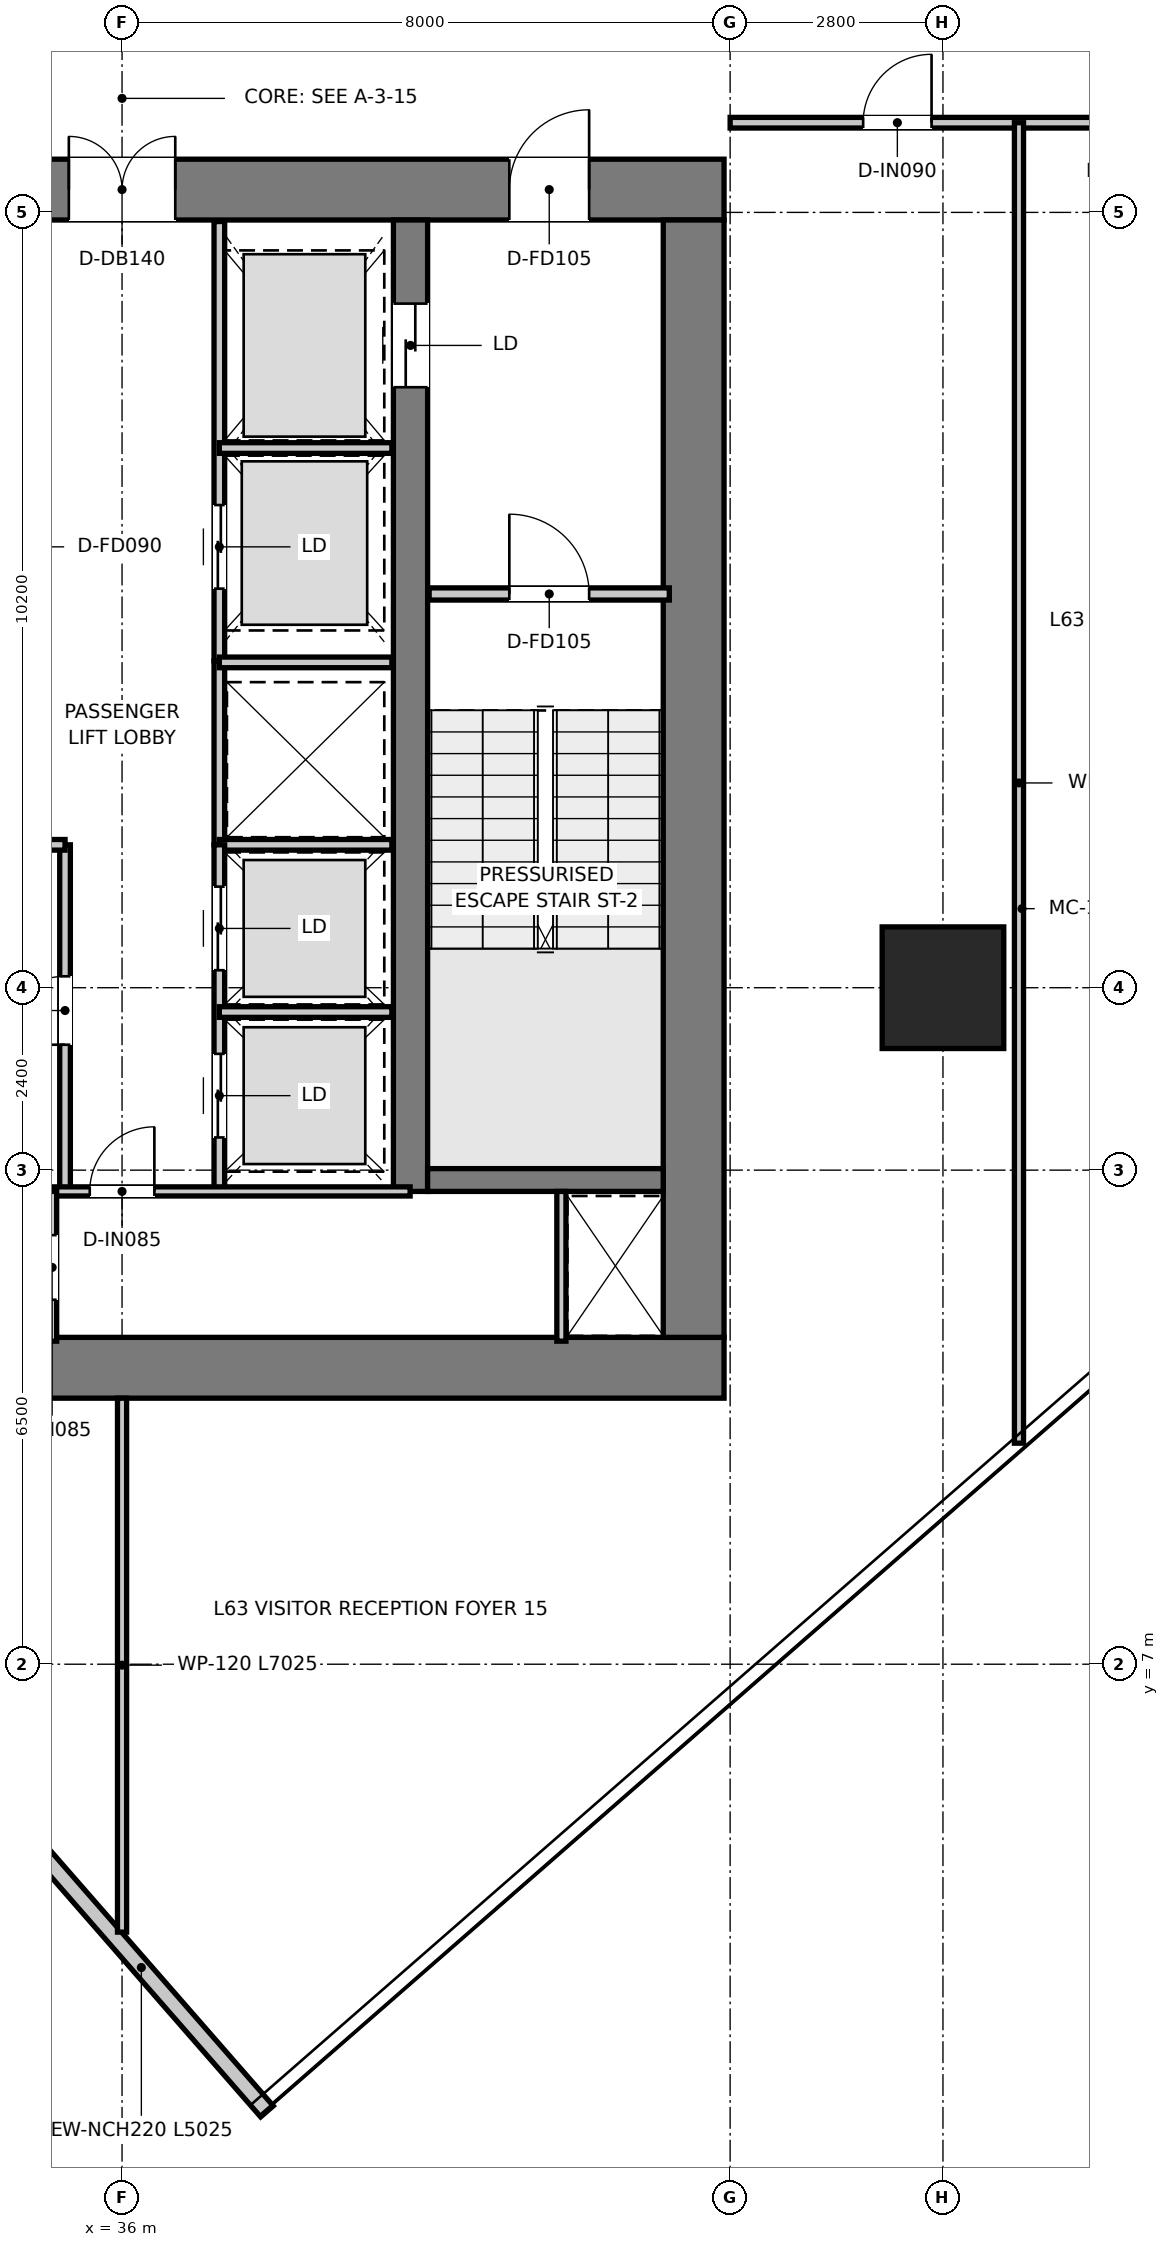
"""IFC4 building model, lengths in metres.
Left out: names, types, materials, properties, quantities, classifications, styles, units other than length and angle.
Written with IfcOpenShell. Run it as: python <this file> out.ifc"""

import sys

from ifc_helpers import new_model, si_unit, direction, frame, frame_2d, origin, origin_2d, place, context, subcontext, project, spatial, rectangle, extrude, source, transform, mapped, element, fill, save


model = new_model("IFC4")
c1 = context("Model", 3, precision=1e-05, world=origin(), true_north=direction((0.0, 1.0)))
c2 = subcontext(c1, "Body", "Model", "MODEL_VIEW")
j1 = project(units=[si_unit("LENGTHUNIT", "METRE"), si_unit("PLANEANGLEUNIT", "RADIAN")], contexts=[c1])
p1 = place(None, origin())
s1 = spatial("IfcSite", under=j1, at=p1, CompositionType="ELEMENT")
p2 = place(p1, origin())
s2 = spatial("IfcBuilding", under=s1, at=p2, CompositionType="ELEMENT")
p3 = place(p2, frame((0.0, 0.0, 258.65)))
s3 = spatial("IfcBuildingStorey", under=s2, at=p3, CompositionType="ELEMENT", Elevation=258.65)
p4 = place(p3, frame((28.08, 10.9, 0.0), z_axis=(0.0, 0.0, 1.0), x_axis=(1.0, 0.0, 0.0)))
e1 = element("IfcWall", 1, at=p4, inside=s3, PredefinedType="SHEAR", context=c2, shape_type="SweptSolid", body=[
    extrude(rectangle(XDim=15.84, YDim=0.8, at=frame_2d((7.92, 0.0))), origin(), (0.0, 0.0, 1.0), 3.95),
])
p5 = place(p3, frame((28.08, 26.4, 0.0), z_axis=(0.0, 0.0, 1.0), x_axis=(1.0, 0.0, 0.0)))
e2 = element("IfcWall", 2, at=p5, inside=s3, PredefinedType="SHEAR", context=c2, shape_type="SweptSolid", body=[
    extrude(rectangle(XDim=15.84, YDim=0.8, at=frame_2d((7.92, 0.0))), origin(), (0.0, 0.0, 1.0), 3.95),
])
p6 = place(p5, frame((7.22, 0.0, 0.0)))
e3 = element("IfcOpeningElement", 3, at=p6, cuts=e2, PredefinedType="OPENING", context=c2, shape_type="SweptSolid", body=[
    extrude(rectangle(XDim=1.4, YDim=2.2, at=frame_2d((0.7, 1.1))), frame((0.0, 0.41, 0.0), z_axis=(0.0, -1.0, 0.0), x_axis=(1.0, 0.0, 0.0)), (0.0, 0.0, 1.0), 0.82),
])
p7 = place(p5, frame((1.775, 0.0, 0.0)))
e4 = element("IfcOpeningElement", 4, at=p7, cuts=e2, PredefinedType="OPENING", context=c2, shape_type="SweptSolid", body=[
    extrude(rectangle(XDim=1.05, YDim=2.1, at=frame_2d((0.525, 1.05))), frame((0.0, 0.41, 0.0), z_axis=(0.0, -1.0, 0.0), x_axis=(1.0, 0.0, 0.0)), (0.0, 0.0, 1.0), 0.82),
])
p8 = place(p5, frame((13.015, 0.0, 0.0)))
e5 = element("IfcOpeningElement", 5, at=p8, cuts=e2, PredefinedType="OPENING", context=c2, shape_type="SweptSolid", body=[
    extrude(rectangle(XDim=1.05, YDim=2.1, at=frame_2d((0.525, 1.05))), frame((0.0, 0.41, 0.0), z_axis=(0.0, -1.0, 0.0), x_axis=(1.0, 0.0, 0.0)), (0.0, 0.0, 1.0), 0.82),
])
p9 = place(p3, frame((43.52, 11.3, 0.0), z_axis=(0.0, 0.0, 1.0), x_axis=(0.0, 1.0, 0.0)))
e6 = element("IfcWall", 6, at=p9, inside=s3, PredefinedType="SHEAR", context=c2, shape_type="SweptSolid", body=[
    extrude(rectangle(XDim=14.7, YDim=0.8, at=frame_2d((7.35, 0.0))), origin(), (0.0, 0.0, 1.0), 3.95),
])
p10 = place(p3, frame((39.795, 13.22, 0.0), z_axis=(0.0, 0.0, 1.0), x_axis=(0.0, 1.0, 0.0)))
e7 = element("IfcWall", 7, at=p10, inside=s3, PredefinedType="SHEAR", context=c2, shape_type="SweptSolid", body=[
    extrude(rectangle(XDim=12.78, YDim=0.45, at=frame_2d((6.39, 0.0))), origin(), (0.0, 0.0, 1.0), 3.95),
])
p11 = place(p10, frame((10.58, 0.0, 0.0)))
e8 = element("IfcOpeningElement", 8, at=p11, cuts=e7, PredefinedType="OPENING", context=c2, shape_type="SweptSolid", body=[
    extrude(rectangle(XDim=1.1, YDim=2.15, at=frame_2d((0.55, 1.075))), frame((0.0, 0.235, 0.0), z_axis=(0.0, -1.0, 0.0), x_axis=(1.0, 0.0, 0.0)), (0.0, 0.0, 1.0), 0.47),
])
p12 = place(p3, frame((40.02, 13.37, 0.0), z_axis=(0.0, 0.0, 1.0), x_axis=(1.0, 0.0, 0.0)))
e9 = element("IfcWall", 9, at=p12, inside=s3, PredefinedType="SHEAR", context=c2, shape_type="SweptSolid", body=[
    extrude(rectangle(XDim=3.1, YDim=0.3, at=frame_2d((1.55, 0.0))), origin(), (0.0, 0.0, 1.0), 3.95),
])
m1 = source(origin(), c2, "Body", "SweptSolid", [
    extrude(rectangle(XDim=1.6, YDim=1.6, at=origin_2d()), origin(), (0.0, 0.0, 1.0), 3.95),
])
p13 = place(p3, frame((46.8, 15.9, 0.0), z_axis=(0.0, 0.0, 1.0), x_axis=(1.0, 0.0, 0.0)))
e10 = element("IfcColumn", 10, at=p13, inside=s3, PredefinedType="USERDEFINED", context=c2, shape_type="MappedRepresentation", body=[
    mapped(m1, transform((0.0, 0.0, 0.0), x_axis=(1.0, 0.0, 0.0), y_axis=(0.0, 1.0, 0.0), z_axis=(0.0, 0.0, 1.0), scale=1.0)),
])
p14 = place(p3, frame((34.602, 4.902, 0.0), z_axis=(0.0, 0.0, 1.0), x_axis=(0.657706226339, -0.753274531518, 0.0)))
e11 = element("IfcWall", 11, at=p14, inside=s3, PredefinedType="ELEMENTEDWALL", context=c2, shape_type="SweptSolid", body=[
    extrude(rectangle(XDim=5.025, YDim=0.22, at=frame_2d((2.512, 0.0))), origin(), (0.0, 0.0, 1.0), 3.6),
])
p15 = place(p3, frame((40.04, 21.08, 0.0), z_axis=(0.0, 0.0, 1.0), x_axis=(1.0, 0.0, 0.0)))
e12 = element("IfcWall", 12, at=p15, inside=s3, PredefinedType="PARTITIONING", context=c2, shape_type="SweptSolid", body=[
    extrude(rectangle(XDim=3.16, YDim=0.16, at=frame_2d((1.58, 0.0))), origin(), (0.0, 0.0, 1.0), 3.6),
])
p16 = place(p15, frame((1.055, 0.0, 0.0)))
e13 = element("IfcOpeningElement", 13, at=p16, cuts=e12, PredefinedType="OPENING", context=c2, shape_type="SweptSolid", body=[
    extrude(rectangle(XDim=1.05, YDim=2.1, at=frame_2d((0.525, 1.05))), frame((0.0, 0.09, 0.0), z_axis=(0.0, -1.0, 0.0), x_axis=(1.0, 0.0, 0.0)), (0.0, 0.0, 1.0), 0.18),
])
p17 = place(p3, frame((37.28, 20.2, 0.0), z_axis=(0.0, 0.0, 1.0), x_axis=(0.0, 1.0, 0.0)))
e14 = element("IfcWall", 14, at=p17, inside=s3, PredefinedType="PARTITIONING", context=c2, shape_type="SweptSolid", body=[
    extrude(rectangle(XDim=5.78, YDim=0.14, at=frame_2d((2.89, 0.0))), origin(), (0.0, 0.0, 1.0), 2.75),
])
p18 = place(p17, frame((0.95, 0.0, 0.0)))
e15 = element("IfcOpeningElement", 15, at=p18, cuts=e14, PredefinedType="OPENING", context=c2, shape_type="SweptSolid", body=[
    extrude(rectangle(XDim=1.1, YDim=2.15, at=frame_2d((0.55, 1.075))), frame((0.0, 0.08, 0.0), z_axis=(0.0, -1.0, 0.0), x_axis=(1.0, 0.0, 0.0)), (0.0, 0.0, 1.0), 0.16),
])
p19 = place(p3, frame((37.28, 23.0, 0.0), z_axis=(0.0, 0.0, 1.0), x_axis=(1.0, 0.0, 0.0)))
e16 = element("IfcWall", 16, at=p19, inside=s3, PredefinedType="PARTITIONING", context=c2, shape_type="SweptSolid", body=[
    extrude(rectangle(XDim=2.27, YDim=0.14, at=frame_2d((1.135, 0.0))), origin(), (0.0, 0.0, 1.0), 2.75),
])
p20 = place(p3, frame((37.28, 17.78, 0.0), z_axis=(0.0, 0.0, 1.0), x_axis=(0.0, 1.0, 0.0)))
e17 = element("IfcWall", 17, at=p20, inside=s3, PredefinedType="PARTITIONING", context=c2, shape_type="SweptSolid", body=[
    extrude(rectangle(XDim=2.42, YDim=0.14, at=frame_2d((1.21, 0.0))), origin(), (0.0, 0.0, 1.0), 3.6),
])
for number, where, z_axis, x_axis in (
    (18, (37.28, 17.78, 0.0), (0.0, 0.0, 1.0), (1.0, 0.0, 0.0)),
    (19, (37.28, 20.18, 0.0), (0.0, 0.0, 1.0), (1.0, 0.0, 0.0)),
):
    element("IfcWall", number, at=place(p3, frame(where, z_axis=z_axis, x_axis=x_axis)), inside=s3, PredefinedType="PARTITIONING", context=c2, shape_type="SweptSolid", body=[
        extrude(rectangle(XDim=2.27, YDim=0.14, at=frame_2d((1.135, 0.0))), origin(), (0.0, 0.0, 1.0), 3.6),
    ])
p21 = place(p3, frame((35.25, 13.22, 0.0), z_axis=(0.0, 0.0, 1.0), x_axis=(0.0, 1.0, 0.0)))
e20 = element("IfcWall", 20, at=p21, inside=s3, PredefinedType="PARTITIONING", context=c2, shape_type="SweptSolid", body=[
    extrude(rectangle(XDim=4.56, YDim=0.14, at=frame_2d((2.28, 0.0))), origin(), (0.0, 0.0, 1.0), 3.6),
])
p22 = place(p21, frame((1.93, 0.0, 0.0)))
e21 = element("IfcOpeningElement", 21, at=p22, cuts=e20, PredefinedType="OPENING", context=c2, shape_type="SweptSolid", body=[
    extrude(rectangle(XDim=0.9, YDim=2.1, at=frame_2d((0.45, 1.05))), frame((0.0, 0.08, 0.0), z_axis=(0.0, -1.0, 0.0), x_axis=(1.0, 0.0, 0.0)), (0.0, 0.0, 1.0), 0.16),
])
p23 = place(p3, frame((34.72, 17.78, 0.0), z_axis=(0.0, 0.0, 1.0), x_axis=(1.0, 0.0, 0.0)))
e22 = element("IfcWall", 22, at=p23, inside=s3, PredefinedType="PARTITIONING", context=c2, shape_type="SweptSolid", body=[
    extrude(rectangle(XDim=0.53, YDim=0.14, at=frame_2d((0.265, 0.0))), origin(), (0.0, 0.0, 1.0), 3.6),
])
p24 = place(p3, frame((37.28, 13.22, 0.0), z_axis=(0.0, 0.0, 1.0), x_axis=(0.0, 1.0, 0.0)))
e23 = element("IfcWall", 23, at=p24, inside=s3, PredefinedType="PARTITIONING", context=c2, shape_type="SweptSolid", body=[
    extrude(rectangle(XDim=4.56, YDim=0.14, at=frame_2d((2.28, 0.0))), origin(), (0.0, 0.0, 1.0), 3.6),
])
p25 = place(p24, frame((0.71, 0.0, 0.0)))
e24 = element("IfcOpeningElement", 24, at=p25, cuts=e23, PredefinedType="OPENING", context=c2, shape_type="SweptSolid", body=[
    extrude(rectangle(XDim=1.1, YDim=2.15, at=frame_2d((0.55, 1.075))), frame((0.0, 0.08, 0.0), z_axis=(0.0, -1.0, 0.0), x_axis=(1.0, 0.0, 0.0)), (0.0, 0.0, 1.0), 0.16),
])
p26 = place(p24, frame((2.91, 0.0, 0.0)))
e25 = element("IfcOpeningElement", 25, at=p26, cuts=e23, PredefinedType="OPENING", context=c2, shape_type="SweptSolid", body=[
    extrude(rectangle(XDim=1.1, YDim=2.15, at=frame_2d((0.55, 1.075))), frame((0.0, 0.08, 0.0), z_axis=(0.0, -1.0, 0.0), x_axis=(1.0, 0.0, 0.0)), (0.0, 0.0, 1.0), 0.16),
])
p27 = place(p3, frame((37.28, 15.58, 0.0), z_axis=(0.0, 0.0, 1.0), x_axis=(1.0, 0.0, 0.0)))
e26 = element("IfcWall", 26, at=p27, inside=s3, PredefinedType="PARTITIONING", context=c2, shape_type="SweptSolid", body=[
    extrude(rectangle(XDim=2.27, YDim=0.14, at=frame_2d((1.135, 0.0))), origin(), (0.0, 0.0, 1.0), 3.6),
])
p28 = place(p3, frame((41.78, 11.25, 0.0), z_axis=(0.0, 0.0, 1.0), x_axis=(0.0, 1.0, 0.0)))
e27 = element("IfcWall", 27, at=p28, inside=s3, PredefinedType="PARTITIONING", context=c2, shape_type="SweptSolid", body=[
    extrude(rectangle(XDim=1.97, YDim=0.12, at=frame_2d((0.985, 0.0))), origin(), (0.0, 0.0, 1.0), 3.6),
])
p29 = place(p3, frame((32.21, 13.22, 0.0), z_axis=(0.0, 0.0, 1.0), x_axis=(1.0, 0.0, 0.0)))
e28 = element("IfcWall", 28, at=p29, inside=s3, PredefinedType="PARTITIONING", context=c2, shape_type="SweptSolid", body=[
    extrude(rectangle(XDim=7.58, YDim=0.12, at=frame_2d((3.79, 0.0))), origin(), (0.0, 0.0, 1.0), 3.6),
])
p30 = place(p29, frame((3.365, 0.0, 0.0)))
e29 = element("IfcOpeningElement", 29, at=p30, cuts=e28, PredefinedType="OPENING", context=c2, shape_type="SweptSolid", body=[
    extrude(rectangle(XDim=0.85, YDim=2.1, at=frame_2d((0.425, 1.05))), frame((0.0, 0.07, 0.0), z_axis=(0.0, -1.0, 0.0), x_axis=(1.0, 0.0, 0.0)), (0.0, 0.0, 1.0), 0.14),
])
p31 = place(p3, frame((35.08, 11.25, 0.0), z_axis=(0.0, 0.0, 1.0), x_axis=(0.0, 1.0, 0.0)))
e30 = element("IfcWall", 30, at=p31, inside=s3, PredefinedType="PARTITIONING", context=c2, shape_type="SweptSolid", body=[
    extrude(rectangle(XDim=1.97, YDim=0.12, at=frame_2d((0.985, 0.0))), origin(), (0.0, 0.0, 1.0), 3.6),
])
p32 = place(p31, frame((0.545, 0.0, 0.0)))
e31 = element("IfcOpeningElement", 31, at=p32, cuts=e30, PredefinedType="OPENING", context=c2, shape_type="SweptSolid", body=[
    extrude(rectangle(XDim=0.85, YDim=2.1, at=frame_2d((0.425, 1.05))), frame((0.0, 0.07, 0.0), z_axis=(0.0, -1.0, 0.0), x_axis=(1.0, 0.0, 0.0)), (0.0, 0.0, 1.0), 0.14),
])
p33 = place(p3, frame((44.0, 27.28, 0.0), z_axis=(0.0, 0.0, 1.0), x_axis=(1.0, 0.0, 0.0)))
e32 = element("IfcWall", 32, at=p33, inside=s3, PredefinedType="PARTITIONING", context=c2, shape_type="SweptSolid", body=[
    extrude(rectangle(XDim=15.889, YDim=0.14, at=frame_2d((7.944, 0.0))), origin(), (0.0, 0.0, 1.0), 2.96),
])
p34 = place(p33, frame((1.75, 0.0, 0.0)))
e33 = element("IfcOpeningElement", 33, at=p34, cuts=e32, PredefinedType="OPENING", context=c2, shape_type="SweptSolid", body=[
    extrude(rectangle(XDim=0.9, YDim=2.1, at=frame_2d((0.45, 1.05))), frame((0.0, 0.08, 0.0), z_axis=(0.0, -1.0, 0.0), x_axis=(1.0, 0.0, 0.0)), (0.0, 0.0, 1.0), 0.16),
])
p35 = place(p33, frame((4.75, 0.0, 0.0)))
e34 = element("IfcOpeningElement", 34, at=p35, cuts=e32, PredefinedType="OPENING", context=c2, shape_type="SweptSolid", body=[
    extrude(rectangle(XDim=0.9, YDim=2.1, at=frame_2d((0.45, 1.05))), frame((0.0, 0.08, 0.0), z_axis=(0.0, -1.0, 0.0), x_axis=(1.0, 0.0, 0.0)), (0.0, 0.0, 1.0), 0.16),
])
p36 = place(p33, frame((12.313, 0.0, 0.0)))
e35 = element("IfcOpeningElement", 35, at=p36, cuts=e32, PredefinedType="OPENING", context=c2, shape_type="SweptSolid", body=[
    extrude(rectangle(XDim=0.9, YDim=2.1, at=frame_2d((0.45, 1.05))), frame((0.0, 0.08, 0.0), z_axis=(0.0, -1.0, 0.0), x_axis=(1.0, 0.0, 0.0)), (0.0, 0.0, 1.0), 0.16),
])
p37 = place(p3, frame((36.0, 3.475, 0.0), z_axis=(0.0, 0.0, 1.0), x_axis=(0.0, 1.0, 0.0)))
e36 = element("IfcWall", 36, at=p37, inside=s3, PredefinedType="PARTITIONING", context=c2, shape_type="SweptSolid", body=[
    extrude(rectangle(XDim=7.025, YDim=0.12, at=frame_2d((3.512, 0.0))), origin(), (0.0, 0.0, 1.0), 3.6),
])
p38 = place(p3, frame((47.8, 9.908, 0.0), z_axis=(0.0, 0.0, 1.0), x_axis=(0.0, 1.0, 0.0)))
e37 = element("IfcWall", 37, at=p38, inside=s3, PredefinedType="PARTITIONING", context=c2, shape_type="SweptSolid", body=[
    extrude(rectangle(XDim=17.372, YDim=0.12, at=frame_2d((8.686, 0.0))), origin(), (0.0, 0.0, 1.0), 3.11),
])
p39 = place(p16, origin())
e38 = element("IfcDoor", 38, at=p39, inside=s3, OperationType="SINGLE_SWING_LEFT", PredefinedType="DOOR", context=c2, shape_type="SweptSolid", body=[
    extrude(rectangle(XDim=1.05, YDim=2.1, at=frame_2d((0.525, 1.05))), frame((0.0, 0.025, 0.0), z_axis=(0.0, -1.0, 0.0), x_axis=(1.0, 0.0, 0.0)), (0.0, 0.0, 1.0), 0.05),
])
fill(e13, e38)
p40 = place(p6, origin())
e39 = element("IfcDoor", 39, at=p40, inside=s3, OperationType="DOUBLE_DOOR_SINGLE_SWING", PredefinedType="DOOR", context=c2, shape_type="SweptSolid", body=[
    extrude(rectangle(XDim=1.4, YDim=2.2, at=frame_2d((0.7, 1.1))), frame((0.0, 0.025, 0.0), z_axis=(0.0, -1.0, 0.0), x_axis=(1.0, 0.0, 0.0)), (0.0, 0.0, 1.0), 0.05),
])
fill(e3, e39)
p41 = place(p8, origin())
e40 = element("IfcDoor", 40, at=p41, inside=s3, OperationType="SINGLE_SWING_RIGHT", PredefinedType="DOOR", context=c2, shape_type="SweptSolid", body=[
    extrude(rectangle(XDim=1.05, YDim=2.1, at=frame_2d((0.525, 1.05))), frame((0.0, 0.025, 0.0), z_axis=(0.0, -1.0, 0.0), x_axis=(1.0, 0.0, 0.0)), (0.0, 0.0, 1.0), 0.05),
])
fill(e5, e40)
p42 = place(p11, origin())
e41 = element("IfcDoor", 41, at=p42, inside=s3, OperationType="DOUBLE_DOOR_SLIDING", PredefinedType="DOOR", context=c2, shape_type="SweptSolid", body=[
    extrude(rectangle(XDim=1.1, YDim=2.15, at=frame_2d((0.55, 1.075))), frame((0.0, 0.025, 0.0), z_axis=(0.0, -1.0, 0.0), x_axis=(1.0, 0.0, 0.0)), (0.0, 0.0, 1.0), 0.05),
])
fill(e8, e41)
p43 = place(p18, origin())
e42 = element("IfcDoor", 42, at=p43, inside=s3, OperationType="DOUBLE_DOOR_SLIDING", PredefinedType="DOOR", context=c2, shape_type="SweptSolid", body=[
    extrude(rectangle(XDim=1.1, YDim=2.15, at=frame_2d((0.55, 1.075))), frame((0.0, 0.025, 0.0), z_axis=(0.0, -1.0, 0.0), x_axis=(1.0, 0.0, 0.0)), (0.0, 0.0, 1.0), 0.05),
])
fill(e15, e42)
p44 = place(p22, origin())
e43 = element("IfcDoor", 43, at=p44, inside=s3, OperationType="SINGLE_SWING_LEFT", PredefinedType="DOOR", context=c2, shape_type="SweptSolid", body=[
    extrude(rectangle(XDim=0.9, YDim=2.1, at=frame_2d((0.45, 1.05))), frame((0.0, 0.025, 0.0), z_axis=(0.0, -1.0, 0.0), x_axis=(1.0, 0.0, 0.0)), (0.0, 0.0, 1.0), 0.05),
])
fill(e21, e43)
p45 = place(p25, origin())
e44 = element("IfcDoor", 44, at=p45, inside=s3, OperationType="DOUBLE_DOOR_SLIDING", PredefinedType="DOOR", context=c2, shape_type="SweptSolid", body=[
    extrude(rectangle(XDim=1.1, YDim=2.15, at=frame_2d((0.55, 1.075))), frame((0.0, 0.025, 0.0), z_axis=(0.0, -1.0, 0.0), x_axis=(1.0, 0.0, 0.0)), (0.0, 0.0, 1.0), 0.05),
])
fill(e24, e44)
p46 = place(p26, origin())
e45 = element("IfcDoor", 45, at=p46, inside=s3, OperationType="DOUBLE_DOOR_SLIDING", PredefinedType="DOOR", context=c2, shape_type="SweptSolid", body=[
    extrude(rectangle(XDim=1.1, YDim=2.15, at=frame_2d((0.55, 1.075))), frame((0.0, 0.025, 0.0), z_axis=(0.0, -1.0, 0.0), x_axis=(1.0, 0.0, 0.0)), (0.0, 0.0, 1.0), 0.05),
])
fill(e25, e45)
p47 = place(p30, origin())
e46 = element("IfcDoor", 46, at=p47, inside=s3, OperationType="SINGLE_SWING_RIGHT", PredefinedType="DOOR", context=c2, shape_type="SweptSolid", body=[
    extrude(rectangle(XDim=0.85, YDim=2.1, at=frame_2d((0.425, 1.05))), frame((0.0, 0.025, 0.0), z_axis=(0.0, -1.0, 0.0), x_axis=(1.0, 0.0, 0.0)), (0.0, 0.0, 1.0), 0.05),
])
fill(e29, e46)
p48 = place(p32, origin())
e47 = element("IfcDoor", 47, at=p48, inside=s3, OperationType="SINGLE_SWING_LEFT", PredefinedType="DOOR", context=c2, shape_type="SweptSolid", body=[
    extrude(rectangle(XDim=0.85, YDim=2.1, at=frame_2d((0.425, 1.05))), frame((0.0, 0.025, 0.0), z_axis=(0.0, -1.0, 0.0), x_axis=(1.0, 0.0, 0.0)), (0.0, 0.0, 1.0), 0.05),
])
fill(e31, e47)
p49 = place(p34, origin())
e48 = element("IfcDoor", 48, at=p49, inside=s3, OperationType="SINGLE_SWING_RIGHT", PredefinedType="DOOR", context=c2, shape_type="SweptSolid", body=[
    extrude(rectangle(XDim=0.9, YDim=2.1, at=frame_2d((0.45, 1.05))), frame((0.0, 0.025, 0.0), z_axis=(0.0, -1.0, 0.0), x_axis=(1.0, 0.0, 0.0)), (0.0, 0.0, 1.0), 0.05),
])
fill(e33, e48)
save(model, sys.argv[1])
